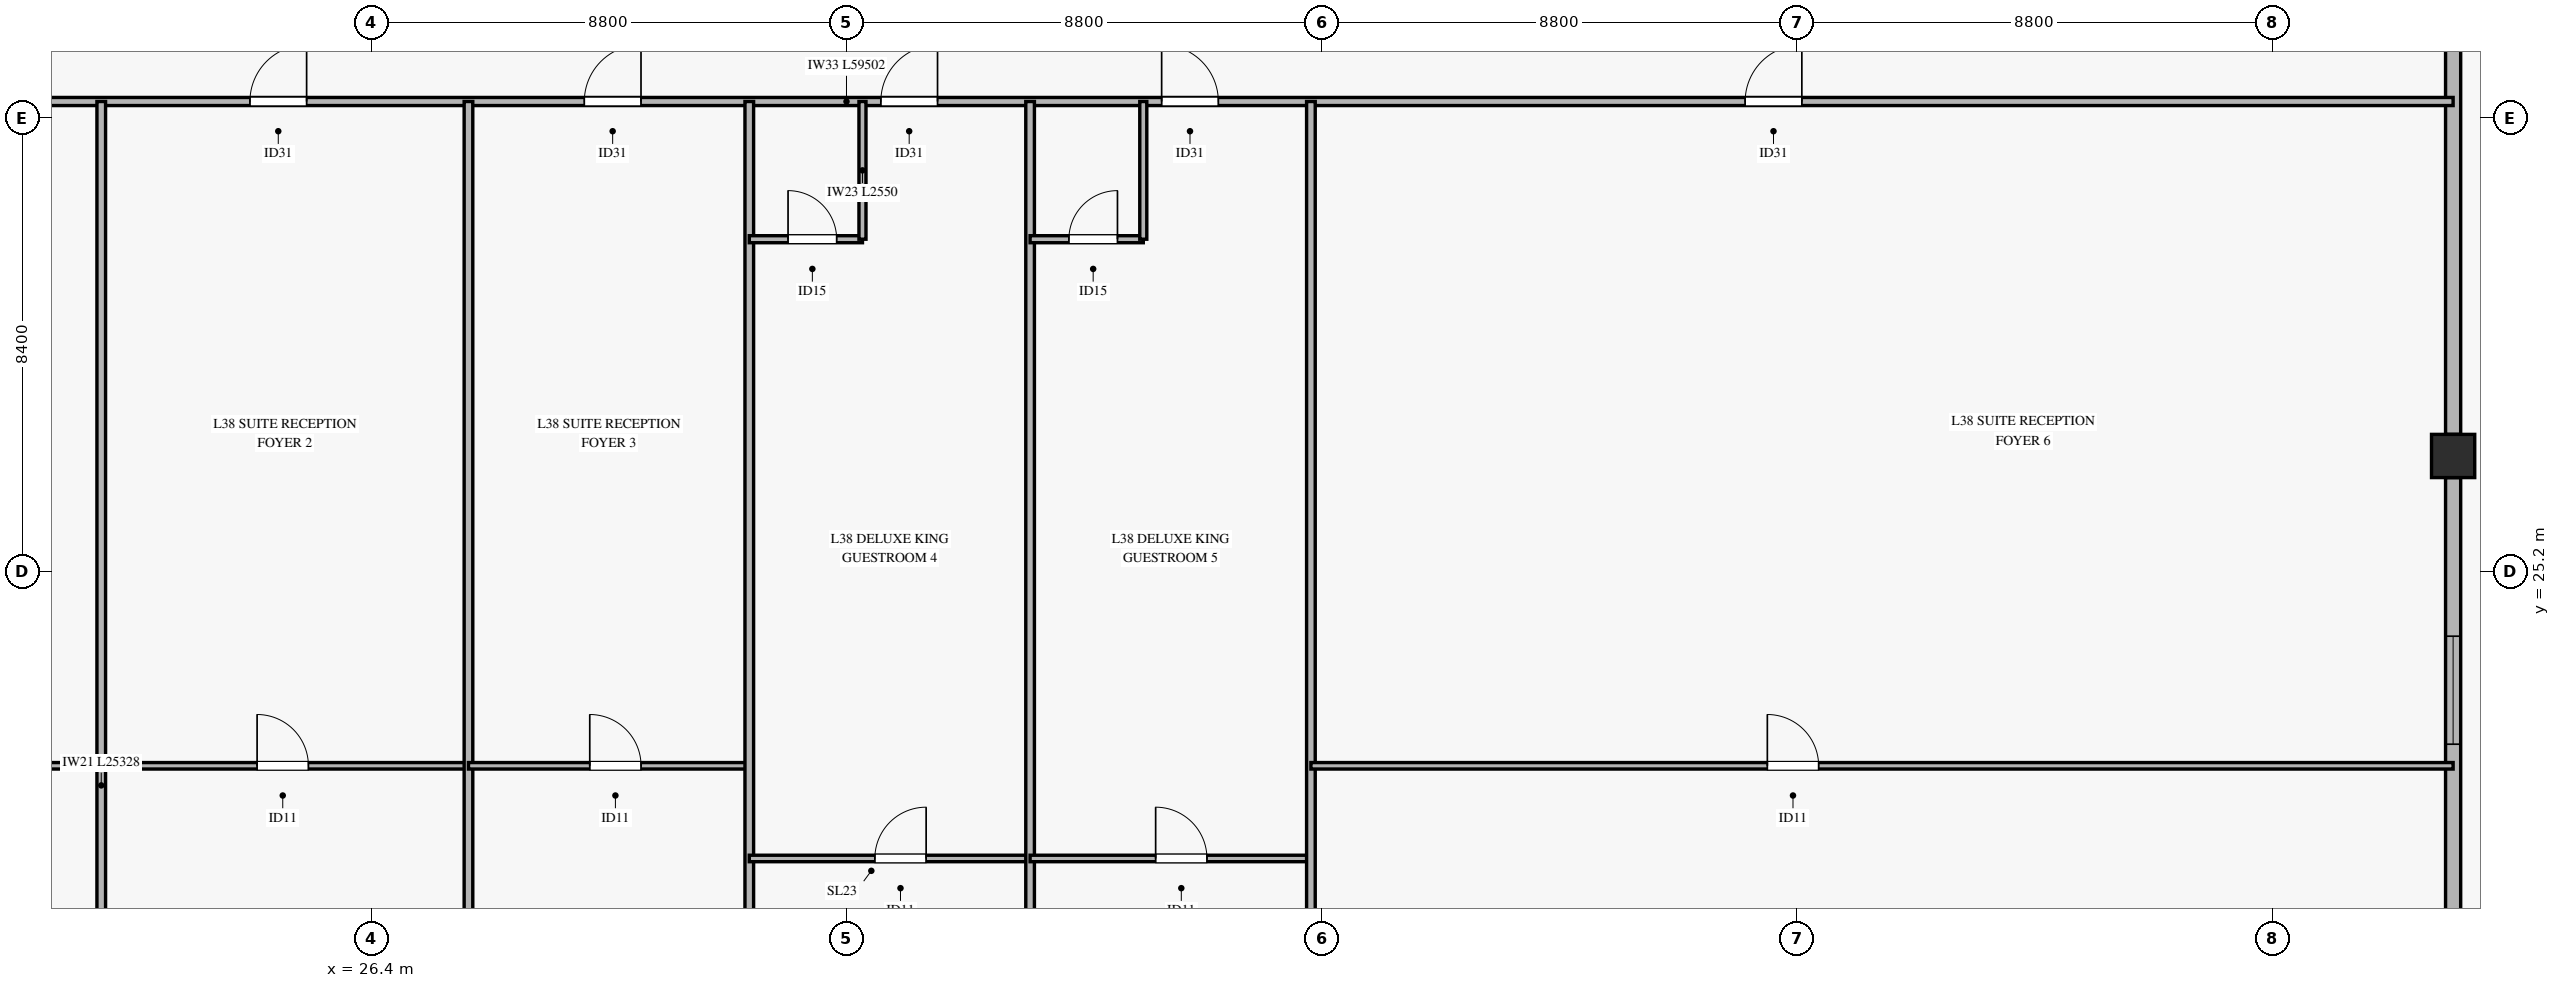
"""IFC4 building model, lengths in metres.
Left out: names, types, materials, properties, quantities, classifications, styles, units other than length and angle.
Written with IfcOpenShell. Run it as: python <this file> out.ifc"""

import sys

from ifc_helpers import new_model, si_unit, direction, frame, frame_2d, origin, origin_2d, place, context, subcontext, project, spatial, rectangle, hollow_rectangle, extrude, source, transform, mapped, element, fill, save


model = new_model("IFC4")
c1 = context("Model", 3, precision=1e-05, world=origin(), true_north=direction((0.0, 1.0)))
c2 = subcontext(c1, "Body", "Model", "MODEL_VIEW")
j1 = project(units=[si_unit("LENGTHUNIT", "METRE"), si_unit("PLANEANGLEUNIT", "RADIAN")], contexts=[c1])
p1 = place(None, origin())
s1 = spatial("IfcSite", under=j1, at=p1, CompositionType="ELEMENT")
p2 = place(p1, origin())
s2 = spatial("IfcBuilding", under=s1, at=p2, CompositionType="ELEMENT")
p3 = place(p2, frame((0.0, 0.0, 156.2)))
s3 = spatial("IfcBuildingStorey", under=s2, at=p3, CompositionType="ELEMENT", Elevation=156.2)
m1 = source(origin(), c2, "Body", "SweptSolid", [
    extrude(hollow_rectangle(XDim=0.8, YDim=0.8, WallThickness=0.036, at=origin_2d()), origin(), (0.0, 0.0, 1.0), 3.289),
])
p4 = place(p3, frame((64.951, 27.336, 0.0), z_axis=(-0.071408941168, 0.080019582723, 0.994232180882), x_axis=(-0.74610956251, -0.665823190292, 0.0)))
e1 = element("IfcColumn", 1, at=p4, inside=s3, PredefinedType="COLUMN", context=c2, shape_type="MappedRepresentation", body=[
    mapped(m1, transform((0.0, 0.0, 0.0), x_axis=(1.0, 0.0, 0.0), y_axis=(0.0, 1.0, 0.0), z_axis=(0.0, 0.0, 1.0), scale=1.0)),
])
p5 = place(p3, frame((64.951, 11.511, 0.0), z_axis=(0.0, 0.0, 1.0), x_axis=(0.0, 1.0, 0.0)))
e2 = element("IfcWall", 2, at=p5, inside=s3, PredefinedType="SOLIDWALL", context=c2, shape_type="SweptSolid", body=[
    extrude(rectangle(XDim=15.425, YDim=0.28, at=frame_2d((7.712, 0.0))), origin(), (0.0, 0.0, 1.0), 2.75),
])
p6 = place(p5, frame((3.251, 0.0, 0.45)))
e3 = element("IfcOpeningElement", 3, at=p6, cuts=e2, PredefinedType="OPENING", context=c2, shape_type="SweptSolid", body=[
    extrude(rectangle(XDim=2.0, YDim=2.0, at=frame_2d((1.0, 1.0))), frame((0.0, 0.15, 0.0), z_axis=(0.0, -1.0, 0.0), x_axis=(1.0, 0.0, 0.0)), (0.0, 0.0, 1.0), 0.3),
])
p7 = place(p5, frame((10.488, 0.0, 0.45)))
e4 = element("IfcOpeningElement", 4, at=p7, cuts=e2, PredefinedType="OPENING", context=c2, shape_type="SweptSolid", body=[
    extrude(rectangle(XDim=2.0, YDim=2.0, at=frame_2d((1.0, 1.0))), frame((0.0, 0.15, 0.0), z_axis=(0.0, -1.0, 0.0), x_axis=(1.0, 0.0, 0.0)), (0.0, 0.0, 1.0), 0.3),
])
p8 = place(p3, frame((64.951, 27.736, 0.0), z_axis=(0.0, 0.0, 1.0), x_axis=(0.0, 1.0, 0.0)))
e5 = element("IfcWall", 5, at=p8, inside=s3, PredefinedType="SOLIDWALL", context=c2, shape_type="SweptSolid", body=[
    extrude(rectangle(XDim=15.425, YDim=0.28, at=frame_2d((7.712, 0.0))), origin(), (0.0, 0.0, 1.0), 2.75),
])
p9 = place(p8, frame((10.119, 0.0, 0.45)))
e6 = element("IfcOpeningElement", 6, at=p9, cuts=e5, PredefinedType="OPENING", context=c2, shape_type="SweptSolid", body=[
    extrude(rectangle(XDim=2.0, YDim=2.0, at=frame_2d((1.0, 1.0))), frame((0.0, 0.15, 0.0), z_axis=(0.0, -1.0, 0.0), x_axis=(1.0, 0.0, 0.0)), (0.0, 0.0, 1.0), 0.3),
])
p10 = place(p3, frame((5.449, 33.9, 0.0), z_axis=(0.0, 0.0, 1.0), x_axis=(1.0, 0.0, 0.0)))
e7 = element("IfcWall", 7, at=p10, inside=s3, PredefinedType="PARTITIONING", context=c2, shape_type="SweptSolid", body=[
    extrude(rectangle(XDim=59.502, YDim=0.15, at=frame_2d((29.751, 0.0))), origin(), (0.0, 0.0, 1.0), 2.455),
])
p11 = place(p10, frame((6.5, 0.0, 0.0)))
e8 = element("IfcOpeningElement", 8, at=p11, cuts=e7, PredefinedType="OPENING", context=c2, shape_type="SweptSolid", body=[
    extrude(rectangle(XDim=1.05, YDim=2.15, at=frame_2d((0.525, 1.075))), frame((0.0, 0.085, 0.0), z_axis=(0.0, -1.0, 0.0), x_axis=(1.0, 0.0, 0.0)), (0.0, 0.0, 1.0), 0.17),
])
p12 = place(p10, frame((18.704, 0.0, 0.0)))
e9 = element("IfcOpeningElement", 9, at=p12, cuts=e7, PredefinedType="OPENING", context=c2, shape_type="SweptSolid", body=[
    extrude(rectangle(XDim=1.05, YDim=2.15, at=frame_2d((0.525, 1.075))), frame((0.0, 0.085, 0.0), z_axis=(0.0, -1.0, 0.0), x_axis=(1.0, 0.0, 0.0)), (0.0, 0.0, 1.0), 0.17),
])
p13 = place(p10, frame((24.896, 0.0, 0.0)))
e10 = element("IfcOpeningElement", 10, at=p13, cuts=e7, PredefinedType="OPENING", context=c2, shape_type="SweptSolid", body=[
    extrude(rectangle(XDim=1.05, YDim=2.15, at=frame_2d((0.525, 1.075))), frame((0.0, 0.085, 0.0), z_axis=(0.0, -1.0, 0.0), x_axis=(1.0, 0.0, 0.0)), (0.0, 0.0, 1.0), 0.17),
])
p14 = place(p10, frame((30.387, 0.0, 0.0)))
e11 = element("IfcOpeningElement", 11, at=p14, cuts=e7, PredefinedType="OPENING", context=c2, shape_type="SweptSolid", body=[
    extrude(rectangle(XDim=1.05, YDim=2.15, at=frame_2d((0.525, 1.075))), frame((0.0, 0.085, 0.0), z_axis=(0.0, -1.0, 0.0), x_axis=(1.0, 0.0, 0.0)), (0.0, 0.0, 1.0), 0.17),
])
p15 = place(p10, frame((35.587, 0.0, 0.0)))
e12 = element("IfcOpeningElement", 12, at=p15, cuts=e7, PredefinedType="OPENING", context=c2, shape_type="SweptSolid", body=[
    extrude(rectangle(XDim=1.05, YDim=2.15, at=frame_2d((0.525, 1.075))), frame((0.0, 0.085, 0.0), z_axis=(0.0, -1.0, 0.0), x_axis=(1.0, 0.0, 0.0)), (0.0, 0.0, 1.0), 0.17),
])
p16 = place(p10, frame((46.392, 0.0, 0.0)))
e13 = element("IfcOpeningElement", 13, at=p16, cuts=e7, PredefinedType="OPENING", context=c2, shape_type="SweptSolid", body=[
    extrude(rectangle(XDim=1.05, YDim=2.15, at=frame_2d((0.525, 1.075))), frame((0.0, 0.085, 0.0), z_axis=(0.0, -1.0, 0.0), x_axis=(1.0, 0.0, 0.0)), (0.0, 0.0, 1.0), 0.17),
])
p17 = place(p3, frame((5.449, 21.599, 0.0), z_axis=(0.0, 0.0, 1.0), x_axis=(1.0, 0.0, 0.0)))
e14 = element("IfcWall", 14, at=p17, inside=s3, PredefinedType="PARTITIONING", context=c2, shape_type="SweptSolid", body=[
    extrude(rectangle(XDim=15.951, YDim=0.12, at=frame_2d((7.976, 0.0))), origin(), (0.0, 0.0, 1.0), 2.455),
])
p18 = place(p17, frame((6.807, 0.0, 0.0)))
e15 = element("IfcOpeningElement", 15, at=p18, cuts=e14, PredefinedType="OPENING", context=c2, shape_type="SweptSolid", body=[
    extrude(rectangle(XDim=0.95, YDim=2.1, at=frame_2d((0.475, 1.05))), frame((0.0, 0.07, 0.0), z_axis=(0.0, -1.0, 0.0), x_axis=(1.0, 0.0, 0.0)), (0.0, 0.0, 1.0), 0.14),
])
p19 = place(p3, frame((21.4, 8.572, 0.0), z_axis=(0.0, 0.0, 1.0), x_axis=(0.0, 1.0, 0.0)))
e16 = element("IfcWall", 16, at=p19, inside=s3, PredefinedType="PARTITIONING", context=c2, shape_type="SweptSolid", body=[
    extrude(rectangle(XDim=25.328, YDim=0.16, at=frame_2d((12.664, 0.0))), origin(), (0.0, 0.0, 1.0), 2.755),
])
p20 = place(p3, frame((21.4, 21.599, 0.0), z_axis=(0.0, 0.0, 1.0), x_axis=(1.0, 0.0, 0.0)))
e17 = element("IfcWall", 17, at=p20, inside=s3, PredefinedType="PARTITIONING", context=c2, shape_type="SweptSolid", body=[
    extrude(rectangle(XDim=6.8, YDim=0.12, at=frame_2d((3.4, 0.0))), origin(), (0.0, 0.0, 1.0), 3.27),
])
p21 = place(p20, frame((2.886, 0.0, 0.0)))
e18 = element("IfcOpeningElement", 18, at=p21, cuts=e17, PredefinedType="OPENING", context=c2, shape_type="SweptSolid", body=[
    extrude(rectangle(XDim=0.95, YDim=2.1, at=frame_2d((0.475, 1.05))), frame((0.0, 0.07, 0.0), z_axis=(0.0, -1.0, 0.0), x_axis=(1.0, 0.0, 0.0)), (0.0, 0.0, 1.0), 0.14),
])
p22 = place(p3, frame((28.2, 8.572, 0.0), z_axis=(0.0, 0.0, 1.0), x_axis=(0.0, 1.0, 0.0)))
e19 = element("IfcWall", 19, at=p22, inside=s3, PredefinedType="PARTITIONING", context=c2, shape_type="SweptSolid", body=[
    extrude(rectangle(XDim=25.328, YDim=0.16, at=frame_2d((12.664, 0.0))), origin(), (0.0, 0.0, 1.0), 2.755),
])
p23 = place(p3, frame((28.2, 21.599, 0.0), z_axis=(0.0, 0.0, 1.0), x_axis=(1.0, 0.0, 0.0)))
e20 = element("IfcWall", 20, at=p23, inside=s3, PredefinedType="PARTITIONING", context=c2, shape_type="SweptSolid", body=[
    extrude(rectangle(XDim=5.2, YDim=0.12, at=frame_2d((2.6, 0.0))), origin(), (0.0, 0.0, 1.0), 2.455),
])
p24 = place(p23, frame((2.246, 0.0, 0.0)))
e21 = element("IfcOpeningElement", 21, at=p24, cuts=e20, PredefinedType="OPENING", context=c2, shape_type="SweptSolid", body=[
    extrude(rectangle(XDim=0.95, YDim=2.1, at=frame_2d((0.475, 1.05))), frame((0.0, 0.07, 0.0), z_axis=(0.0, -1.0, 0.0), x_axis=(1.0, 0.0, 0.0)), (0.0, 0.0, 1.0), 0.14),
])
p25 = place(p3, frame((33.4, 8.572, 0.0), z_axis=(0.0, 0.0, 1.0), x_axis=(0.0, 1.0, 0.0)))
e22 = element("IfcWall", 22, at=p25, inside=s3, PredefinedType="PARTITIONING", context=c2, shape_type="SweptSolid", body=[
    extrude(rectangle(XDim=25.328, YDim=0.16, at=frame_2d((12.664, 0.0))), origin(), (0.0, 0.0, 1.0), 2.755),
])
p26 = place(p3, frame((33.4, 31.35, 0.0), z_axis=(0.0, 0.0, 1.0), x_axis=(1.0, 0.0, 0.0)))
e23 = element("IfcWall", 23, at=p26, inside=s3, PredefinedType="PARTITIONING", context=c2, shape_type="SweptSolid", body=[
    extrude(rectangle(XDim=2.096, YDim=0.13, at=frame_2d((1.048, 0.0))), origin(), (0.0, 0.0, 1.0), 3.27),
])
p27 = place(p26, frame((0.718, 0.0, 0.0)))
e24 = element("IfcOpeningElement", 24, at=p27, cuts=e23, PredefinedType="OPENING", context=c2, shape_type="SweptSolid", body=[
    extrude(rectangle(XDim=0.9, YDim=2.1, at=frame_2d((0.45, 1.05))), frame((0.0, 0.075, 0.0), z_axis=(0.0, -1.0, 0.0), x_axis=(1.0, 0.0, 0.0)), (0.0, 0.0, 1.0), 0.15),
])
p28 = place(p3, frame((35.496, 31.35, 0.0), z_axis=(0.0, 0.0, 1.0), x_axis=(0.0, 1.0, 0.0)))
e25 = element("IfcWall", 25, at=p28, inside=s3, PredefinedType="PARTITIONING", context=c2, shape_type="SweptSolid", body=[
    extrude(rectangle(XDim=2.55, YDim=0.13, at=frame_2d((1.275, 0.0))), origin(), (0.0, 0.0, 1.0), 2.805),
])
p29 = place(p3, frame((33.4, 19.883, 0.0), z_axis=(0.0, 0.0, 1.0), x_axis=(1.0, 0.0, 0.0)))
e26 = element("IfcWall", 26, at=p29, inside=s3, PredefinedType="PARTITIONING", context=c2, shape_type="SweptSolid", body=[
    extrude(rectangle(XDim=5.2, YDim=0.12, at=frame_2d((2.6, 0.0))), origin(), (0.0, 0.0, 1.0), 2.455),
])
p30 = place(p29, frame((2.325, 0.0, 0.0)))
e27 = element("IfcOpeningElement", 27, at=p30, cuts=e26, PredefinedType="OPENING", context=c2, shape_type="SweptSolid", body=[
    extrude(rectangle(XDim=0.95, YDim=2.1, at=frame_2d((0.475, 1.05))), frame((0.0, 0.07, 0.0), z_axis=(0.0, -1.0, 0.0), x_axis=(1.0, 0.0, 0.0)), (0.0, 0.0, 1.0), 0.14),
])
p31 = place(p3, frame((38.6, 8.572, 0.0), z_axis=(0.0, 0.0, 1.0), x_axis=(0.0, 1.0, 0.0)))
e28 = element("IfcWall", 28, at=p31, inside=s3, PredefinedType="PARTITIONING", context=c2, shape_type="SweptSolid", body=[
    extrude(rectangle(XDim=25.328, YDim=0.16, at=frame_2d((12.664, 0.0))), origin(), (0.0, 0.0, 1.0), 2.755),
])
p32 = place(p3, frame((38.6, 31.35, 0.0), z_axis=(0.0, 0.0, 1.0), x_axis=(1.0, 0.0, 0.0)))
e29 = element("IfcWall", 29, at=p32, inside=s3, PredefinedType="PARTITIONING", context=c2, shape_type="SweptSolid", body=[
    extrude(rectangle(XDim=2.096, YDim=0.13, at=frame_2d((1.048, 0.0))), origin(), (0.0, 0.0, 1.0), 3.27),
])
p33 = place(p32, frame((0.718, 0.0, 0.0)))
e30 = element("IfcOpeningElement", 30, at=p33, cuts=e29, PredefinedType="OPENING", context=c2, shape_type="SweptSolid", body=[
    extrude(rectangle(XDim=0.9, YDim=2.1, at=frame_2d((0.45, 1.05))), frame((0.0, 0.075, 0.0), z_axis=(0.0, -1.0, 0.0), x_axis=(1.0, 0.0, 0.0)), (0.0, 0.0, 1.0), 0.15),
])
p34 = place(p3, frame((40.696, 31.35, 0.0), z_axis=(0.0, 0.0, 1.0), x_axis=(0.0, 1.0, 0.0)))
e31 = element("IfcWall", 31, at=p34, inside=s3, PredefinedType="PARTITIONING", context=c2, shape_type="SweptSolid", body=[
    extrude(rectangle(XDim=2.55, YDim=0.13, at=frame_2d((1.275, 0.0))), origin(), (0.0, 0.0, 1.0), 2.805),
])
p35 = place(p3, frame((38.6, 19.883, 0.0), z_axis=(0.0, 0.0, 1.0), x_axis=(1.0, 0.0, 0.0)))
e32 = element("IfcWall", 32, at=p35, inside=s3, PredefinedType="PARTITIONING", context=c2, shape_type="SweptSolid", body=[
    extrude(rectangle(XDim=5.2, YDim=0.12, at=frame_2d((2.6, 0.0))), origin(), (0.0, 0.0, 1.0), 3.27),
])
p36 = place(p35, frame((2.325, 0.0, 0.0)))
e33 = element("IfcOpeningElement", 33, at=p36, cuts=e32, PredefinedType="OPENING", context=c2, shape_type="SweptSolid", body=[
    extrude(rectangle(XDim=0.95, YDim=2.1, at=frame_2d((0.475, 1.05))), frame((0.0, 0.07, 0.0), z_axis=(0.0, -1.0, 0.0), x_axis=(1.0, 0.0, 0.0)), (0.0, 0.0, 1.0), 0.14),
])
p37 = place(p3, frame((43.8, 8.572, 0.0), z_axis=(0.0, 0.0, 1.0), x_axis=(0.0, 1.0, 0.0)))
e34 = element("IfcWall", 34, at=p37, inside=s3, PredefinedType="PARTITIONING", context=c2, shape_type="SweptSolid", body=[
    extrude(rectangle(XDim=25.328, YDim=0.16, at=frame_2d((12.664, 0.0))), origin(), (0.0, 0.0, 1.0), 2.755),
])
p38 = place(p3, frame((43.8, 21.599, 0.0), z_axis=(0.0, 0.0, 1.0), x_axis=(1.0, 0.0, 0.0)))
e35 = element("IfcWall", 35, at=p38, inside=s3, PredefinedType="PARTITIONING", context=c2, shape_type="SweptSolid", body=[
    extrude(rectangle(XDim=21.151, YDim=0.12, at=frame_2d((10.575, 0.0))), origin(), (0.0, 0.0, 1.0), 2.455),
])
p39 = place(p38, frame((8.452, 0.0, 0.0)))
e36 = element("IfcOpeningElement", 36, at=p39, cuts=e35, PredefinedType="OPENING", context=c2, shape_type="SweptSolid", body=[
    extrude(rectangle(XDim=0.95, YDim=2.1, at=frame_2d((0.475, 1.05))), frame((0.0, 0.07, 0.0), z_axis=(0.0, -1.0, 0.0), x_axis=(1.0, 0.0, 0.0)), (0.0, 0.0, 1.0), 0.14),
])
m2 = source(origin(), c2, "Body", "SweptSolid", [
    extrude(rectangle(XDim=2.0, YDim=2.0, at=frame_2d((1.0, 1.0))), frame((0.0, 0.03, 0.0), z_axis=(0.0, -1.0, 0.0), x_axis=(1.0, 0.0, 0.0)), (0.0, 0.0, 1.0), 0.06),
])
p40 = place(p7, origin())
e37 = element("IfcWindow", 37, at=p40, inside=s3, PartitioningType="SINGLE_PANEL", PredefinedType="WINDOW", context=c2, shape_type="MappedRepresentation", body=[
    mapped(m2, transform((0.0, 0.0, 0.0), x_axis=(1.0, 0.0, 0.0), y_axis=(0.0, 1.0, 0.0), z_axis=(0.0, 0.0, 1.0), scale=1.0)),
])
fill(e4, e37)
m3 = source(origin(), c2, "Body", "SweptSolid", [
    extrude(rectangle(XDim=1.05, YDim=2.15, at=frame_2d((0.525, 1.075))), frame((0.0, 0.025, 0.0), z_axis=(0.0, -1.0, 0.0), x_axis=(1.0, 0.0, 0.0)), (0.0, 0.0, 1.0), 0.05),
])
p41 = place(p12, origin())
e38 = element("IfcDoor", 38, at=p41, inside=s3, OperationType="SINGLE_SWING_RIGHT", PredefinedType="DOOR", context=c2, shape_type="MappedRepresentation", body=[
    mapped(m3, transform((0.0, 0.0, 0.0), x_axis=(1.0, 0.0, 0.0), y_axis=(0.0, 1.0, 0.0), z_axis=(0.0, 0.0, 1.0), scale=1.0)),
])
fill(e9, e38)
m4 = source(origin(), c2, "Body", "SweptSolid", [
    extrude(rectangle(XDim=0.95, YDim=2.1, at=frame_2d((0.475, 1.05))), frame((0.0, 0.025, 0.0), z_axis=(0.0, -1.0, 0.0), x_axis=(1.0, 0.0, 0.0)), (0.0, 0.0, 1.0), 0.05),
])
p42 = place(p21, origin())
e39 = element("IfcDoor", 39, at=p42, inside=s3, OperationType="SINGLE_SWING_LEFT", PredefinedType="DOOR", context=c2, shape_type="MappedRepresentation", body=[
    mapped(m4, transform((0.0, 0.0, 0.0), x_axis=(1.0, 0.0, 0.0), y_axis=(0.0, 1.0, 0.0), z_axis=(0.0, 0.0, 1.0), scale=1.0)),
])
fill(e18, e39)
p43 = place(p13, origin())
e40 = element("IfcDoor", 40, at=p43, inside=s3, OperationType="SINGLE_SWING_RIGHT", PredefinedType="DOOR", context=c2, shape_type="MappedRepresentation", body=[
    mapped(m3, transform((0.0, 0.0, 0.0), x_axis=(1.0, 0.0, 0.0), y_axis=(0.0, 1.0, 0.0), z_axis=(0.0, 0.0, 1.0), scale=1.0)),
])
fill(e10, e40)
p44 = place(p24, origin())
e41 = element("IfcDoor", 41, at=p44, inside=s3, OperationType="SINGLE_SWING_LEFT", PredefinedType="DOOR", context=c2, shape_type="MappedRepresentation", body=[
    mapped(m4, transform((0.0, 0.0, 0.0), x_axis=(1.0, 0.0, 0.0), y_axis=(0.0, 1.0, 0.0), z_axis=(0.0, 0.0, 1.0), scale=1.0)),
])
fill(e21, e41)
p45 = place(p14, origin())
e42 = element("IfcDoor", 42, at=p45, inside=s3, OperationType="SINGLE_SWING_RIGHT", PredefinedType="DOOR", context=c2, shape_type="MappedRepresentation", body=[
    mapped(m3, transform((0.0, 0.0, 0.0), x_axis=(1.0, 0.0, 0.0), y_axis=(0.0, 1.0, 0.0), z_axis=(0.0, 0.0, 1.0), scale=1.0)),
])
fill(e11, e42)
m5 = source(origin(), c2, "Body", "SweptSolid", [
    extrude(rectangle(XDim=0.9, YDim=2.1, at=frame_2d((0.45, 1.05))), frame((0.0, 0.025, 0.0), z_axis=(0.0, -1.0, 0.0), x_axis=(1.0, 0.0, 0.0)), (0.0, 0.0, 1.0), 0.05),
])
p46 = place(p27, origin())
e43 = element("IfcDoor", 43, at=p46, inside=s3, OperationType="SINGLE_SWING_LEFT", PredefinedType="DOOR", context=c2, shape_type="MappedRepresentation", body=[
    mapped(m5, transform((0.0, 0.0, 0.0), x_axis=(1.0, 0.0, 0.0), y_axis=(0.0, 1.0, 0.0), z_axis=(0.0, 0.0, 1.0), scale=1.0)),
])
fill(e24, e43)
p47 = place(p30, origin())
e44 = element("IfcDoor", 44, at=p47, inside=s3, OperationType="SINGLE_SWING_RIGHT", PredefinedType="DOOR", context=c2, shape_type="MappedRepresentation", body=[
    mapped(m4, transform((0.0, 0.0, 0.0), x_axis=(1.0, 0.0, 0.0), y_axis=(0.0, 1.0, 0.0), z_axis=(0.0, 0.0, 1.0), scale=1.0)),
])
fill(e27, e44)
p48 = place(p15, origin())
e45 = element("IfcDoor", 45, at=p48, inside=s3, OperationType="SINGLE_SWING_LEFT", PredefinedType="DOOR", context=c2, shape_type="MappedRepresentation", body=[
    mapped(m3, transform((0.0, 0.0, 0.0), x_axis=(1.0, 0.0, 0.0), y_axis=(0.0, 1.0, 0.0), z_axis=(0.0, 0.0, 1.0), scale=1.0)),
])
fill(e12, e45)
p49 = place(p33, origin())
e46 = element("IfcDoor", 46, at=p49, inside=s3, OperationType="SINGLE_SWING_RIGHT", PredefinedType="DOOR", context=c2, shape_type="MappedRepresentation", body=[
    mapped(m5, transform((0.0, 0.0, 0.0), x_axis=(1.0, 0.0, 0.0), y_axis=(0.0, 1.0, 0.0), z_axis=(0.0, 0.0, 1.0), scale=1.0)),
])
fill(e30, e46)
p50 = place(p36, origin())
e47 = element("IfcDoor", 47, at=p50, inside=s3, OperationType="SINGLE_SWING_LEFT", PredefinedType="DOOR", context=c2, shape_type="MappedRepresentation", body=[
    mapped(m4, transform((0.0, 0.0, 0.0), x_axis=(1.0, 0.0, 0.0), y_axis=(0.0, 1.0, 0.0), z_axis=(0.0, 0.0, 1.0), scale=1.0)),
])
fill(e33, e47)
p51 = place(p16, origin())
e48 = element("IfcDoor", 48, at=p51, inside=s3, OperationType="SINGLE_SWING_RIGHT", PredefinedType="DOOR", context=c2, shape_type="MappedRepresentation", body=[
    mapped(m3, transform((0.0, 0.0, 0.0), x_axis=(1.0, 0.0, 0.0), y_axis=(0.0, 1.0, 0.0), z_axis=(0.0, 0.0, 1.0), scale=1.0)),
])
fill(e13, e48)
p52 = place(p39, origin())
e49 = element("IfcDoor", 49, at=p52, inside=s3, OperationType="SINGLE_SWING_LEFT", PredefinedType="DOOR", context=c2, shape_type="MappedRepresentation", body=[
    mapped(m4, transform((0.0, 0.0, 0.0), x_axis=(1.0, 0.0, 0.0), y_axis=(0.0, 1.0, 0.0), z_axis=(0.0, 0.0, 1.0), scale=1.0)),
])
fill(e36, e49)
save(model, sys.argv[1])
